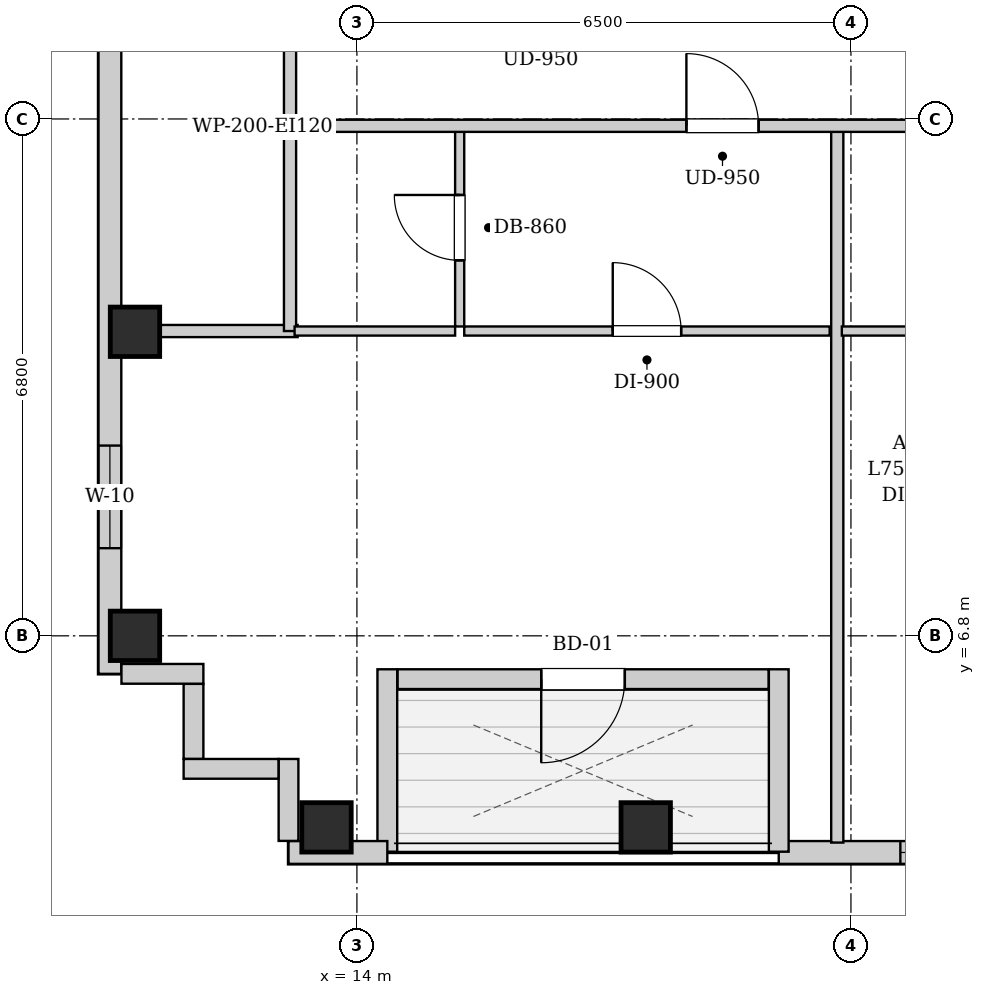
"""IFC4 building model, lengths in metres.
Left out: names, types, materials, properties, quantities, classifications, styles, units other than length and angle.
Written with IfcOpenShell. Run it as: python <this file> out.ifc"""

import sys

from ifc_helpers import new_model, si_unit, direction, frame, frame_2d, origin, origin_2d, place, context, subcontext, project, spatial, rectangle, extrude, element, fill, save


model = new_model("IFC4")
c1 = context("Model", 3, precision=1e-05, world=origin(), true_north=direction((0.0, 1.0)))
c2 = subcontext(c1, "Body", "Model", "MODEL_VIEW")
j1 = project(units=[si_unit("LENGTHUNIT", "METRE"), si_unit("PLANEANGLEUNIT", "RADIAN")], contexts=[c1])
p1 = place(None, origin())
s1 = spatial("IfcSite", under=j1, at=p1, CompositionType="ELEMENT")
p2 = place(p1, origin())
s2 = spatial("IfcBuilding", under=s1, at=p2, CompositionType="ELEMENT")
p3 = place(p2, frame((0.0, 0.0, 258.1)))
s3 = spatial("IfcBuildingStorey", under=s2, at=p3, CompositionType="ELEMENT", Elevation=258.1)
for number, where, z_axis, x_axis in (
    (1, (13.6, 4.28, 0.0), (0.0, 0.0, 1.0), (1.0, 0.0, 0.0)),
    (2, (17.8, 4.28, 0.0), (0.0, 0.0, 1.0), (1.0, 0.0, 0.0)),
    (3, (11.08, 6.8, 0.0), (0.0, 0.0, 1.0), (1.0, 0.0, 0.0)),
    (4, (11.08, 10.8, 0.0), (0.0, 0.0, 1.0), (1.0, 0.0, 0.0)),
):
    element("IfcColumn", number, at=place(p3, frame(where, z_axis=z_axis, x_axis=x_axis)), inside=s3, PredefinedType="COLUMN", context=c2, shape_type="SweptSolid", body=[
        extrude(rectangle(XDim=0.65, YDim=0.65, at=origin_2d()), origin(), (0.0, 0.0, 1.0), 3.4),
    ])
p4 = place(p3, frame((31.5, 3.95, 0.0), z_axis=(0.0, 0.0, 1.0), x_axis=(-1.0, 0.0, 0.0)))
e5 = element("IfcWall", 5, at=p4, inside=s3, PredefinedType="SOLIDWALL", context=c2, shape_type="SweptSolid", body=[
    extrude(rectangle(XDim=11.95, YDim=0.3, at=frame_2d((5.975, 0.0))), origin(), (0.0, 0.0, 1.0), 3.05),
])
p5 = place(p4, frame((9.0, 0.0, 0.55)))
e6 = element("IfcOpeningElement", 6, at=p5, cuts=e5, PredefinedType="OPENING", context=c2, shape_type="SweptSolid", body=[
    extrude(rectangle(XDim=1.35, YDim=1.2, at=frame_2d((0.675, 0.6))), frame((0.0, 0.16, 0.0), z_axis=(0.0, -1.0, 0.0), x_axis=(1.0, 0.0, 0.0)), (0.0, 0.0, 1.0), 0.32),
])
p6 = place(p4, frame((2.426, 0.0, 0.55)))
e7 = element("IfcOpeningElement", 7, at=p6, cuts=e5, PredefinedType="OPENING", context=c2, shape_type="SweptSolid", body=[
    extrude(rectangle(XDim=1.35, YDim=1.2, at=frame_2d((0.675, 0.6))), frame((0.0, 0.16, 0.0), z_axis=(0.0, -1.0, 0.0), x_axis=(1.0, 0.0, 0.0)), (0.0, 0.0, 1.0), 0.32),
])
p7 = place(p4, frame((0.45, 0.0, 0.55)))
e8 = element("IfcOpeningElement", 8, at=p7, cuts=e5, PredefinedType="OPENING", context=c2, shape_type="SweptSolid", body=[
    extrude(rectangle(XDim=0.85, YDim=1.2, at=frame_2d((0.425, 0.6))), frame((0.0, 0.16, 0.0), z_axis=(0.0, -1.0, 0.0), x_axis=(1.0, 0.0, 0.0)), (0.0, 0.0, 1.0), 0.32),
])
p8 = place(p3, frame((19.55, 3.96, 0.0), z_axis=(0.0, 0.0, 1.0), x_axis=(0.0, 1.0, 0.0)))
e9 = element("IfcWall", 9, at=p8, inside=s3, PredefinedType="SOLIDWALL", context=c2, shape_type="SweptSolid", body=[
    extrude(rectangle(XDim=2.4, YDim=0.26, at=frame_2d((1.2, 0.0))), origin(), (0.0, 0.0, 1.0), 3.05),
])
p9 = place(p3, frame((19.416, 6.23, 0.0), z_axis=(0.0, 0.0, 1.0), x_axis=(-1.0, 0.0, 0.0)))
e10 = element("IfcWall", 10, at=p9, inside=s3, PredefinedType="SOLIDWALL", context=c2, shape_type="SweptSolid", body=[
    extrude(rectangle(XDim=4.882, YDim=0.26, at=frame_2d((2.441, 0.0))), origin(), (0.0, 0.0, 1.0), 3.05),
])
p10 = place(p9, frame((1.891, 0.0, 0.0)))
e11 = element("IfcOpeningElement", 11, at=p10, cuts=e10, PredefinedType="OPENING", context=c2, shape_type="SweptSolid", body=[
    extrude(rectangle(XDim=1.1, YDim=2.0, at=frame_2d((0.55, 1.0))), frame((0.0, 0.14, 0.0), z_axis=(0.0, -1.0, 0.0), x_axis=(1.0, 0.0, 0.0)), (0.0, 0.0, 1.0), 0.28),
])
p11 = place(p3, frame((14.4, 6.36, 0.0), z_axis=(0.0, 0.0, 1.0), x_axis=(0.0, -1.0, 0.0)))
e12 = element("IfcWall", 12, at=p11, inside=s3, PredefinedType="SOLIDWALL", context=c2, shape_type="SweptSolid", body=[
    extrude(rectangle(XDim=2.4, YDim=0.26, at=frame_2d((1.2, 0.0))), origin(), (0.0, 0.0, 1.0), 3.05),
])
p12 = place(p3, frame((14.4, 3.95, 0.0), z_axis=(0.0, 0.0, 1.0), x_axis=(-1.0, 0.0, 0.0)))
e13 = element("IfcWall", 13, at=p12, inside=s3, PredefinedType="SOLIDWALL", context=c2, shape_type="SweptSolid", body=[
    extrude(rectangle(XDim=1.3, YDim=0.3, at=frame_2d((0.65, 0.0))), origin(), (0.0, 0.0, 1.0), 3.05),
])
p13 = place(p3, frame((10.75, 6.3, 0.0), z_axis=(0.0, 0.0, 1.0), x_axis=(0.0, 1.0, 0.0)))
e14 = element("IfcWall", 14, at=p13, inside=s3, PredefinedType="SOLIDWALL", context=c2, shape_type="SweptSolid", body=[
    extrude(rectangle(XDim=31.4, YDim=0.3, at=frame_2d((15.7, 0.0))), origin(), (0.0, 0.0, 1.0), 3.05),
])
p14 = place(p13, frame((1.653, 0.0, 0.55)))
e15 = element("IfcOpeningElement", 15, at=p14, cuts=e14, PredefinedType="OPENING", context=c2, shape_type="SweptSolid", body=[
    extrude(rectangle(XDim=1.35, YDim=1.2, at=frame_2d((0.675, 0.6))), frame((0.0, 0.16, 0.0), z_axis=(0.0, -1.0, 0.0), x_axis=(1.0, 0.0, 0.0)), (0.0, 0.0, 1.0), 0.32),
])
p15 = place(p13, frame((10.367, 0.0, 0.55)))
e16 = element("IfcOpeningElement", 16, at=p15, cuts=e14, PredefinedType="OPENING", context=c2, shape_type="SweptSolid", body=[
    extrude(rectangle(XDim=1.35, YDim=1.2, at=frame_2d((0.675, 0.6))), frame((0.0, 0.16, 0.0), z_axis=(0.0, -1.0, 0.0), x_axis=(1.0, 0.0, 0.0)), (0.0, 0.0, 1.0), 0.32),
])
p16 = place(p13, frame((19.683, 0.0, 0.55)))
e17 = element("IfcOpeningElement", 17, at=p16, cuts=e14, PredefinedType="OPENING", context=c2, shape_type="SweptSolid", body=[
    extrude(rectangle(XDim=1.35, YDim=1.2, at=frame_2d((0.675, 0.6))), frame((0.0, 0.16, 0.0), z_axis=(0.0, -1.0, 0.0), x_axis=(1.0, 0.0, 0.0)), (0.0, 0.0, 1.0), 0.32),
])
p17 = place(p3, frame((13.1, 4.102, 0.0), z_axis=(0.0, 0.0, 1.0), x_axis=(0.0, 1.0, 0.0)))
e18 = element("IfcWall", 18, at=p17, inside=s3, PredefinedType="SOLIDWALL", context=c2, shape_type="SweptSolid", body=[
    extrude(rectangle(XDim=1.078, YDim=0.26, at=frame_2d((0.539, 0.0))), origin(), (0.0, 0.0, 1.0), 3.05),
])
p18 = place(p3, frame((12.968, 5.05, 0.0), z_axis=(0.0, 0.0, 1.0), x_axis=(-1.0, 0.0, 0.0)))
e19 = element("IfcWall", 19, at=p18, inside=s3, PredefinedType="SOLIDWALL", context=c2, shape_type="SweptSolid", body=[
    extrude(rectangle(XDim=1.248, YDim=0.26, at=frame_2d((0.624, 0.0))), origin(), (0.0, 0.0, 1.0), 3.05),
])
p19 = place(p3, frame((11.85, 5.182, 0.0), z_axis=(0.0, 0.0, 1.0), x_axis=(0.0, 1.0, 0.0)))
e20 = element("IfcWall", 20, at=p19, inside=s3, PredefinedType="SOLIDWALL", context=c2, shape_type="SweptSolid", body=[
    extrude(rectangle(XDim=0.986, YDim=0.26, at=frame_2d((0.493, 0.0))), origin(), (0.0, 0.0, 1.0), 3.05),
])
p20 = place(p3, frame((11.98, 6.3, 0.0), z_axis=(0.0, 0.0, 1.0), x_axis=(-1.0, 0.0, 0.0)))
e21 = element("IfcWall", 21, at=p20, inside=s3, PredefinedType="SOLIDWALL", context=c2, shape_type="SweptSolid", body=[
    extrude(rectangle(XDim=1.078, YDim=0.26, at=frame_2d((0.539, 0.0))), origin(), (0.0, 0.0, 1.0), 3.05),
])
p21 = place(p3, frame((13.12, 13.51, 0.0), z_axis=(0.0, 0.0, 1.0), x_axis=(0.0, 1.0, 0.0)))
e22 = element("IfcWall", 22, at=p21, inside=s3, PredefinedType="PARTITIONING", context=c2, shape_type="SweptSolid", body=[
    extrude(rectangle(XDim=1.58, YDim=0.16, at=frame_2d((0.79, 0.0))), origin(), (0.0, 0.0, 1.0), 3.05),
])
p22 = place(p3, frame((10.88, 10.81, 0.0), z_axis=(0.0, 0.0, 1.0), x_axis=(1.0, 0.0, 0.0)))
e23 = element("IfcWall", 23, at=p22, inside=s3, PredefinedType="PARTITIONING", context=c2, shape_type="SweptSolid", body=[
    extrude(rectangle(XDim=2.34, YDim=0.16, at=frame_2d((1.17, 0.0))), origin(), (0.0, 0.0, 1.0), 3.05),
])
p23 = place(p3, frame((13.12, 10.81, 0.0), z_axis=(0.0, 0.0, 1.0), x_axis=(0.0, 1.0, 0.0)))
e24 = element("IfcWall", 24, at=p23, inside=s3, PredefinedType="PARTITIONING", context=c2, shape_type="SweptSolid", body=[
    extrude(rectangle(XDim=2.66, YDim=0.16, at=frame_2d((1.33, 0.0))), origin(), (0.0, 0.0, 1.0), 3.05),
])
p24 = place(p3, frame((15.352, 10.87, 0.0), z_axis=(0.0, 0.0, 1.0), x_axis=(0.0, 1.0, 0.0)))
e25 = element("IfcWall", 25, at=p24, inside=s3, PredefinedType="PARTITIONING", context=c2, shape_type="SweptSolid", body=[
    extrude(rectangle(XDim=2.6, YDim=0.12, at=frame_2d((1.3, 0.0))), origin(), (0.0, 0.0, 1.0), 3.05),
])
p25 = place(p24, frame((0.87, 0.0, 0.0)))
e26 = element("IfcOpeningElement", 26, at=p25, cuts=e25, PredefinedType="OPENING", context=c2, shape_type="SweptSolid", body=[
    extrude(rectangle(XDim=0.86, YDim=2.05, at=frame_2d((0.43, 1.025))), frame((0.0, 0.07, 0.0), z_axis=(0.0, -1.0, 0.0), x_axis=(1.0, 0.0, 0.0)), (0.0, 0.0, 1.0), 0.14),
])
p26 = place(p3, frame((13.18, 10.81, 0.0), z_axis=(0.0, 0.0, 1.0), x_axis=(1.0, 0.0, 0.0)))
e27 = element("IfcWall", 27, at=p26, inside=s3, PredefinedType="PARTITIONING", context=c2, shape_type="SweptSolid", body=[
    extrude(rectangle(XDim=2.112, YDim=0.12, at=frame_2d((1.056, 0.0))), origin(), (0.0, 0.0, 1.0), 3.05),
])
p27 = place(p3, frame((15.412, 10.81, 0.0), z_axis=(0.0, 0.0, 1.0), x_axis=(1.0, 0.0, 0.0)))
e28 = element("IfcWall", 28, at=p27, inside=s3, PredefinedType="PARTITIONING", context=c2, shape_type="SweptSolid", body=[
    extrude(rectangle(XDim=4.808, YDim=0.12, at=frame_2d((2.404, 0.0))), origin(), (0.0, 0.0, 1.0), 3.05),
])
p28 = place(p27, frame((1.954, 0.0, 0.0)))
e29 = element("IfcOpeningElement", 29, at=p28, cuts=e28, PredefinedType="OPENING", context=c2, shape_type="SweptSolid", body=[
    extrude(rectangle(XDim=0.9, YDim=2.05, at=frame_2d((0.45, 1.025))), frame((0.0, 0.07, 0.0), z_axis=(0.0, -1.0, 0.0), x_axis=(1.0, 0.0, 0.0)), (0.0, 0.0, 1.0), 0.14),
])
p29 = place(p3, frame((20.32, 4.08, 0.0), z_axis=(0.0, 0.0, 1.0), x_axis=(0.0, 1.0, 0.0)))
e30 = element("IfcWall", 30, at=p29, inside=s3, PredefinedType="PARTITIONING", context=c2, shape_type="SweptSolid", body=[
    extrude(rectangle(XDim=9.39, YDim=0.16, at=frame_2d((4.695, 0.0))), origin(), (0.0, 0.0, 1.0), 3.05),
])
p30 = place(p3, frame((20.38, 10.81, 0.0), z_axis=(0.0, 0.0, 1.0), x_axis=(1.0, 0.0, 0.0)))
e31 = element("IfcWall", 31, at=p30, inside=s3, PredefinedType="PARTITIONING", context=c2, shape_type="SweptSolid", body=[
    extrude(rectangle(XDim=2.4, YDim=0.12, at=frame_2d((1.2, 0.0))), origin(), (0.0, 0.0, 1.0), 3.05),
])
p31 = place(p3, frame((13.15, 13.51, 0.0), z_axis=(0.0, 0.0, 1.0), x_axis=(1.0, 0.0, 0.0)))
e32 = element("IfcWall", 32, at=p31, inside=s3, PredefinedType="PARTITIONING", context=c2, shape_type="SweptSolid", body=[
    extrude(rectangle(XDim=24.6, YDim=0.16, at=frame_2d((12.3, 0.0))), origin(), (0.0, 0.0, 1.0), 3.05),
])
p32 = place(p31, frame((5.185, 0.0, 0.0)))
e33 = element("IfcOpeningElement", 33, at=p32, cuts=e32, PredefinedType="OPENING", context=c2, shape_type="SweptSolid", body=[
    extrude(rectangle(XDim=0.95, YDim=2.1, at=frame_2d((0.475, 1.05))), frame((0.0, 0.09, 0.0), z_axis=(0.0, -1.0, 0.0), x_axis=(1.0, 0.0, 0.0)), (0.0, 0.0, 1.0), 0.18),
])
p33 = place(p31, frame((11.495, 0.0, 0.0)))
e34 = element("IfcOpeningElement", 34, at=p33, cuts=e32, PredefinedType="OPENING", context=c2, shape_type="SweptSolid", body=[
    extrude(rectangle(XDim=0.95, YDim=2.1, at=frame_2d((0.475, 1.05))), frame((0.0, 0.09, 0.0), z_axis=(0.0, -1.0, 0.0), x_axis=(1.0, 0.0, 0.0)), (0.0, 0.0, 1.0), 0.18),
])
p34 = place(p25, origin())
e35 = element("IfcDoor", 35, at=p34, inside=s3, OperationType="SINGLE_SWING_RIGHT", PredefinedType="DOOR", context=c2, shape_type="SweptSolid", body=[
    extrude(rectangle(XDim=0.86, YDim=2.05, at=frame_2d((0.43, 1.025))), frame((0.0, 0.025, 0.0), z_axis=(0.0, -1.0, 0.0), x_axis=(1.0, 0.0, 0.0)), (0.0, 0.0, 1.0), 0.05),
])
fill(e26, e35)
p35 = place(p28, origin())
e36 = element("IfcDoor", 36, at=p35, inside=s3, OperationType="SINGLE_SWING_LEFT", PredefinedType="DOOR", context=c2, shape_type="SweptSolid", body=[
    extrude(rectangle(XDim=0.9, YDim=2.05, at=frame_2d((0.45, 1.025))), frame((0.0, 0.025, 0.0), z_axis=(0.0, -1.0, 0.0), x_axis=(1.0, 0.0, 0.0)), (0.0, 0.0, 1.0), 0.05),
])
fill(e29, e36)
p36 = place(p32, origin())
e37 = element("IfcDoor", 37, at=p36, inside=s3, OperationType="SINGLE_SWING_LEFT", PredefinedType="DOOR", context=c2, shape_type="SweptSolid", body=[
    extrude(rectangle(XDim=0.95, YDim=2.1, at=frame_2d((0.475, 1.05))), frame((0.0, 0.025, 0.0), z_axis=(0.0, -1.0, 0.0), x_axis=(1.0, 0.0, 0.0)), (0.0, 0.0, 1.0), 0.05),
])
fill(e33, e37)
p37 = place(p10, origin())
e38 = element("IfcDoor", 38, at=p37, inside=s3, OperationType="SINGLE_SWING_RIGHT", PredefinedType="DOOR", context=c2, shape_type="SweptSolid", body=[
    extrude(rectangle(XDim=1.1, YDim=2.0, at=frame_2d((0.55, 1.0))), frame((0.0, 0.025, 0.0), z_axis=(0.0, -1.0, 0.0), x_axis=(1.0, 0.0, 0.0)), (0.0, 0.0, 1.0), 0.05),
])
fill(e11, e38)
p38 = place(p14, origin())
e39 = element("IfcWindow", 39, at=p38, inside=s3, PartitioningType="SINGLE_PANEL", PredefinedType="WINDOW", context=c2, shape_type="SweptSolid", body=[
    extrude(rectangle(XDim=1.35, YDim=1.2, at=frame_2d((0.675, 0.6))), frame((0.0, 0.03, 0.0), z_axis=(0.0, -1.0, 0.0), x_axis=(1.0, 0.0, 0.0)), (0.0, 0.0, 1.0), 0.06),
])
fill(e15, e39)
p39 = place(p5, origin())
e40 = element("IfcWindow", 40, at=p39, inside=s3, PartitioningType="SINGLE_PANEL", PredefinedType="WINDOW", context=c2, shape_type="SweptSolid", body=[
    extrude(rectangle(XDim=1.35, YDim=1.2, at=frame_2d((0.675, 0.6))), frame((0.0, 0.03, 0.0), z_axis=(0.0, -1.0, 0.0), x_axis=(1.0, 0.0, 0.0)), (0.0, 0.0, 1.0), 0.06),
])
fill(e6, e40)
save(model, sys.argv[1])
